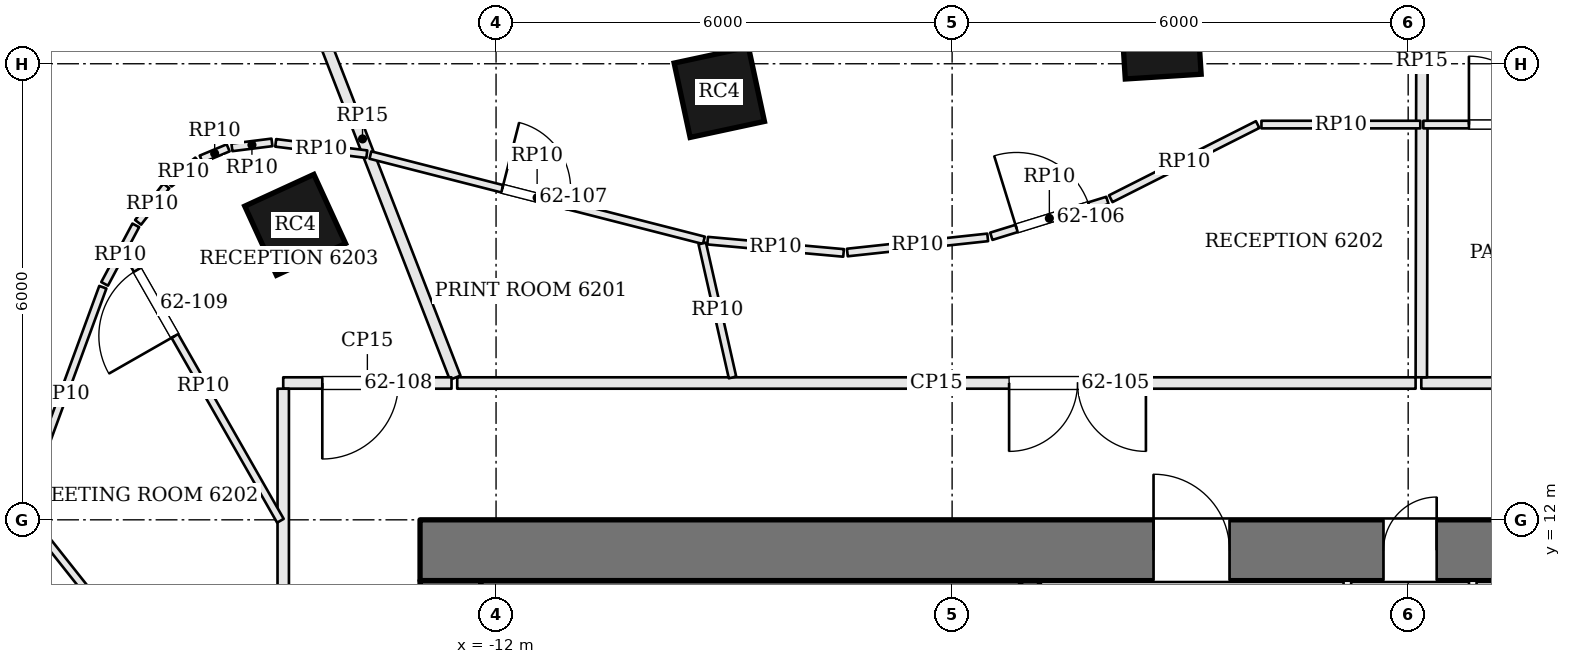
"""IFC4 building model, lengths in metres.
Left out: names, types, materials, properties, quantities, classifications, styles, units other than length and angle.
Written with IfcOpenShell. Run it as: python <this file> out.ifc"""

import sys

from ifc_helpers import new_model, si_unit, direction, frame, frame_2d, origin, origin_2d, place, context, subcontext, project, spatial, rectangle, extrude, element, fill, save


model = new_model("IFC4")
c1 = context("Model", 3, precision=1e-05, world=origin(), true_north=direction((0.0, 1.0)))
c2 = subcontext(c1, "Body", "Model", "MODEL_VIEW")
j1 = project(units=[si_unit("LENGTHUNIT", "METRE"), si_unit("PLANEANGLEUNIT", "RADIAN")], contexts=[c1])
p1 = place(None, origin())
s1 = spatial("IfcSite", under=j1, at=p1, CompositionType="ELEMENT")
p2 = place(p1, origin())
s2 = spatial("IfcBuilding", under=s1, at=p2, CompositionType="ELEMENT")
p3 = place(p2, frame((0.0, 0.0, 252.6)))
s3 = spatial("IfcBuildingStorey", under=s2, at=p3, CompositionType="ELEMENT", Elevation=252.6)
p4 = place(p3, frame((-13.0, 11.6, 0.0), z_axis=(0.0, 0.0, 1.0), x_axis=(1.0, 0.0, 0.0)))
e1 = element("IfcWall", 1, at=p4, inside=s3, PredefinedType="SHEAR", context=c2, shape_type="SweptSolid", body=[
    extrude(rectangle(XDim=26.0, YDim=0.8, at=frame_2d((13.0, 0.0))), origin(), (0.0, 0.0, 1.0), 3.9),
])
p5 = place(p4, frame((9.65, 0.0, 0.0)))
e2 = element("IfcOpeningElement", 2, at=p5, cuts=e1, PredefinedType="OPENING", context=c2, shape_type="SweptSolid", body=[
    extrude(rectangle(XDim=1.0, YDim=2.1, at=frame_2d((0.5, 1.05))), frame((0.0, 0.41, 0.0), z_axis=(0.0, -1.0, 0.0), x_axis=(1.0, 0.0, 0.0)), (0.0, 0.0, 1.0), 0.82),
])
p6 = place(p4, frame((12.675, 0.0, 0.0)))
e3 = element("IfcOpeningElement", 3, at=p6, cuts=e1, PredefinedType="OPENING", context=c2, shape_type="SweptSolid", body=[
    extrude(rectangle(XDim=0.7, YDim=2.1, at=frame_2d((0.35, 1.05))), frame((0.0, 0.41, 0.0), z_axis=(0.0, -1.0, 0.0), x_axis=(1.0, 0.0, 0.0)), (0.0, 0.0, 1.0), 0.82),
])
p7 = place(p4, frame((14.725, 0.0, 0.0)))
e4 = element("IfcOpeningElement", 4, at=p7, cuts=e1, PredefinedType="OPENING", context=c2, shape_type="SweptSolid", body=[
    extrude(rectangle(XDim=0.7, YDim=2.1, at=frame_2d((0.35, 1.05))), frame((0.0, 0.41, 0.0), z_axis=(0.0, -1.0, 0.0), x_axis=(1.0, 0.0, 0.0)), (0.0, 0.0, 1.0), 0.82),
])
p8 = place(p4, frame((16.6, 0.0, 0.0)))
e5 = element("IfcOpeningElement", 5, at=p8, cuts=e1, PredefinedType="OPENING", context=c2, shape_type="SweptSolid", body=[
    extrude(rectangle(XDim=1.0, YDim=2.1, at=frame_2d((0.5, 1.05))), frame((0.0, 0.41, 0.0), z_axis=(0.0, -1.0, 0.0), x_axis=(1.0, 0.0, 0.0)), (0.0, 0.0, 1.0), 0.82),
])
p9 = place(p3, frame((-12.6, -2.2, 0.0), z_axis=(0.0, 0.0, 1.0), x_axis=(0.0, 1.0, 0.0)))
e6 = element("IfcWall", 6, at=p9, inside=s3, PredefinedType="SHEAR", context=c2, shape_type="SweptSolid", body=[
    extrude(rectangle(XDim=13.4, YDim=0.8, at=frame_2d((6.7, 0.0))), origin(), (0.0, 0.0, 1.0), 3.9),
])
p10 = place(p9, frame((4.2, 0.0, 0.0)))
e7 = element("IfcOpeningElement", 7, at=p10, cuts=e6, PredefinedType="OPENING", context=c2, shape_type="SweptSolid", body=[
    extrude(rectangle(XDim=1.8, YDim=2.1, at=frame_2d((0.9, 1.05))), frame((0.0, 0.41, 0.0), z_axis=(0.0, -1.0, 0.0), x_axis=(1.0, 0.0, 0.0)), (0.0, 0.0, 1.0), 0.82),
])
for number, where, z_axis, x_axis in (
    (8, (-3.254, 18.33, 0.0), (0.0, 0.0, 1.0), (-0.998, -0.063, 0.0)),
    (9, (-9.063, 17.625, 0.0), (0.0, 0.0, 1.0), (-0.978, -0.21, 0.0)),
    (10, (-14.643, 15.881, 0.0), (0.0, 0.0, 1.0), (-0.909, -0.417, 0.0)),
):
    element("IfcColumn", number, at=place(p3, frame(where, z_axis=z_axis, x_axis=x_axis)), inside=s3, PredefinedType="COLUMN", context=c2, shape_type="SweptSolid", body=[
        extrude(rectangle(XDim=1.0, YDim=1.0, at=origin_2d()), origin(), (0.0, 0.0, 1.0), 3.9),
    ])
p11 = place(p3, frame((-4.975, -2.2, 0.0), z_axis=(0.0, 0.0, 1.0), x_axis=(0.0, 1.0, 0.0)))
e11 = element("IfcWall", 11, at=p11, inside=s3, PredefinedType="SOLIDWALL", context=c2, shape_type="SweptSolid", body=[
    extrude(rectangle(XDim=13.4, YDim=0.25, at=frame_2d((6.7, 0.0))), origin(), (0.0, 0.0, 1.0), 3.7),
])
p12 = place(p11, frame((5.25, 0.0, 0.0)))
e12 = element("IfcOpeningElement", 12, at=p12, cuts=e11, PredefinedType="OPENING", context=c2, shape_type="SweptSolid", body=[
    extrude(rectangle(XDim=1.2, YDim=2.1, at=frame_2d((0.6, 1.05))), frame((0.0, 0.135, 0.0), z_axis=(0.0, -1.0, 0.0), x_axis=(1.0, 0.0, 0.0)), (0.0, 0.0, 1.0), 0.27),
])
p13 = place(p3, frame((-12.2, 10.9, 0.0), z_axis=(0.0, 0.0, 1.0), x_axis=(1.0, 0.0, 0.0)))
e13 = element("IfcWall", 13, at=p13, inside=s3, PredefinedType="SOLIDWALL", context=c2, shape_type="SweptSolid", body=[
    extrude(rectangle(XDim=7.1, YDim=0.6, at=frame_2d((3.55, 0.0))), origin(), (0.0, 0.0, 1.0), 3.7),
])
for number, where, z_axis, x_axis in (
    (14, (-0.8, 8.6, 0.0), (0.0, 0.0, 1.0), (0.0, 1.0, 0.0)),
    (15, (0.85, 8.6, 0.0), (0.0, 0.0, 1.0), (0.0, 1.0, 0.0)),
):
    element("IfcWall", number, at=place(p3, frame(where, z_axis=z_axis, x_axis=x_axis)), inside=s3, PredefinedType="PARTITIONING", context=c2, shape_type="SweptSolid", body=[
        extrude(rectangle(XDim=2.6, YDim=0.1, at=frame_2d((1.3, 0.0))), origin(), (0.0, 0.0, 1.0), 3.7),
    ])
p14 = place(p3, frame((11.727, 13.8, 0.0), z_axis=(0.0, 0.0, 1.0), x_axis=(-1.0, 0.0, 0.0)))
e16 = element("IfcWall", 16, at=p14, inside=s3, PredefinedType="PARTITIONING", context=c2, shape_type="SweptSolid", body=[
    extrude(rectangle(XDim=11.554, YDim=0.15, at=frame_2d((5.777, 0.0))), origin(), (0.0, 0.0, 1.0), 3.084),
])
p15 = place(p14, frame((2.04, 0.0, 0.0)))
e17 = element("IfcOpeningElement", 17, at=p15, cuts=e16, PredefinedType="OPENING", context=c2, shape_type="SweptSolid", body=[
    extrude(rectangle(XDim=1.8, YDim=2.1, at=frame_2d((0.9, 1.05))), frame((0.0, 0.085, 0.0), z_axis=(0.0, -1.0, 0.0), x_axis=(1.0, 0.0, 0.0)), (0.0, 0.0, 1.0), 0.17),
])
p16 = place(p14, frame((6.737, 0.0, 0.0)))
e18 = element("IfcOpeningElement", 18, at=p16, cuts=e16, PredefinedType="OPENING", context=c2, shape_type="SweptSolid", body=[
    extrude(rectangle(XDim=1.0, YDim=2.4, at=frame_2d((0.5, 1.2))), frame((0.0, 0.085, 0.0), z_axis=(0.0, -1.0, 0.0), x_axis=(1.0, 0.0, 0.0)), (0.0, 0.0, 1.0), 0.17),
])
p17 = place(p3, frame((0.189, 22.19, 0.0), z_axis=(0.0, 0.0, 1.0), x_axis=(-0.001967286324, -0.99999806489, 0.0)))
e19 = element("IfcWall", 19, at=p17, inside=s3, PredefinedType="PARTITIONING", context=c2, shape_type="SweptSolid", body=[
    extrude(rectangle(XDim=8.315, YDim=0.15, at=frame_2d((4.157, 0.0))), origin(), (0.0, 0.0, 1.0), 3.084),
])
p18 = place(p3, frame((0.098, 13.8, 0.0), z_axis=(0.0, 0.0, 1.0), x_axis=(-1.0, 0.0, 0.0)))
e20 = element("IfcWall", 20, at=p18, inside=s3, PredefinedType="PARTITIONING", context=c2, shape_type="SweptSolid", body=[
    extrude(rectangle(XDim=12.609, YDim=0.15, at=frame_2d((6.304, 0.0))), origin(), (0.0, 0.0, 1.0), 3.084),
])
p19 = place(p18, frame((3.548, 0.0, 0.0)))
e21 = element("IfcOpeningElement", 21, at=p19, cuts=e20, PredefinedType="OPENING", context=c2, shape_type="SweptSolid", body=[
    extrude(rectangle(XDim=1.8, YDim=2.1, at=frame_2d((0.9, 1.05))), frame((0.0, 0.085, 0.0), z_axis=(0.0, -1.0, 0.0), x_axis=(1.0, 0.0, 0.0)), (0.0, 0.0, 1.0), 0.17),
])
p20 = place(p3, frame((-14.976, 20.153, 0.0), z_axis=(0.0, 0.0, 1.0), x_axis=(0.361720652029, -0.932286527788, 0.0)))
e22 = element("IfcWall", 22, at=p20, inside=s3, PredefinedType="PARTITIONING", context=c2, shape_type="SweptSolid", body=[
    extrude(rectangle(XDim=6.739, YDim=0.15, at=frame_2d((3.37, 0.0))), origin(), (0.0, 0.0, 1.0), 3.084),
])
p21 = place(p3, frame((-12.586, 13.8, 0.0), z_axis=(0.0, 0.0, 1.0), x_axis=(-1.0, 0.0, 0.0)))
e23 = element("IfcWall", 23, at=p21, inside=s3, PredefinedType="PARTITIONING", context=c2, shape_type="SweptSolid", body=[
    extrude(rectangle(XDim=2.214, YDim=0.15, at=frame_2d((1.107, 0.0))), origin(), (0.0, 0.0, 1.0), 3.084),
])
p22 = place(p21, frame((0.7, 0.0, 0.0)))
e24 = element("IfcOpeningElement", 24, at=p22, cuts=e23, PredefinedType="OPENING", context=c2, shape_type="SweptSolid", body=[
    extrude(rectangle(XDim=1.0, YDim=2.1, at=frame_2d((0.5, 1.05))), frame((0.0, 0.085, 0.0), z_axis=(0.0, -1.0, 0.0), x_axis=(1.0, 0.0, 0.0)), (0.0, 0.0, 1.0), 0.17),
])
p23 = place(p3, frame((-14.8, 13.725, 0.0), z_axis=(0.0, 0.0, 1.0), x_axis=(0.0, -1.0, 0.0)))
e25 = element("IfcWall", 25, at=p23, inside=s3, PredefinedType="PARTITIONING", context=c2, shape_type="SweptSolid", body=[
    extrude(rectangle(XDim=10.038, YDim=0.15, at=frame_2d((5.019, 0.0))), origin(), (0.0, 0.0, 1.0), 3.084),
])
p24 = place(p23, frame((3.361, 0.0, 0.0)))
e26 = element("IfcOpeningElement", 26, at=p24, cuts=e25, PredefinedType="OPENING", context=c2, shape_type="SweptSolid", body=[
    extrude(rectangle(XDim=1.0, YDim=2.4, at=frame_2d((0.5, 1.2))), frame((0.0, 0.085, 0.0), z_axis=(0.0, -1.0, 0.0), x_axis=(1.0, 0.0, 0.0)), (0.0, 0.0, 1.0), 0.17),
])
p25 = place(p23, frame((6.712, 0.0, 0.0)))
e27 = element("IfcOpeningElement", 27, at=p25, cuts=e25, PredefinedType="OPENING", context=c2, shape_type="SweptSolid", body=[
    extrude(rectangle(XDim=1.0, YDim=2.4, at=frame_2d((0.5, 1.2))), frame((0.0, 0.085, 0.0), z_axis=(0.0, -1.0, 0.0), x_axis=(1.0, 0.0, 0.0)), (0.0, 0.0, 1.0), 0.17),
])
p26 = place(p23, frame((8.75, 0.0, 0.0)))
e28 = element("IfcOpeningElement", 28, at=p26, cuts=e25, PredefinedType="OPENING", context=c2, shape_type="SweptSolid", body=[
    extrude(rectangle(XDim=0.9, YDim=2.1, at=frame_2d((0.45, 1.05))), frame((0.0, 0.085, 0.0), z_axis=(0.0, -1.0, 0.0), x_axis=(1.0, 0.0, 0.0)), (0.0, 0.0, 1.0), 0.17),
])
p27 = place(p3, frame((0.199, 17.2, 0.0), z_axis=(0.0, 0.0, 1.0), x_axis=(1.0, 0.0, 0.0)))
e29 = element("IfcWall", 29, at=p27, inside=s3, PredefinedType="PARTITIONING", context=c2, shape_type="SweptSolid", body=[
    extrude(rectangle(XDim=6.586, YDim=0.1, at=frame_2d((3.293, 0.0))), origin(), (0.0, 0.0, 1.0), 3.084),
])
p28 = place(p27, frame((0.6, 0.0, 0.0)))
e30 = element("IfcOpeningElement", 30, at=p28, cuts=e29, PredefinedType="OPENING", context=c2, shape_type="SweptSolid", body=[
    extrude(rectangle(XDim=0.9, YDim=2.1, at=frame_2d((0.45, 1.05))), frame((0.0, 0.06, 0.0), z_axis=(0.0, -1.0, 0.0), x_axis=(1.0, 0.0, 0.0)), (0.0, 0.0, 1.0), 0.12),
])
p29 = place(p3, frame((-13.653, 16.799, 0.0), z_axis=(0.0, 0.0, 1.0), x_axis=(0.968837918763, -0.247695553386, 0.0)))
e31 = element("IfcWall", 31, at=p29, inside=s3, PredefinedType="PARTITIONING", context=c2, shape_type="SweptSolid", body=[
    extrude(rectangle(XDim=4.528, YDim=0.1, at=frame_2d((2.264, 0.0))), origin(), (0.0, 0.0, 1.0), 3.084),
])
p30 = place(p29, frame((1.79, 0.0, 0.0)))
e32 = element("IfcOpeningElement", 32, at=p30, cuts=e31, PredefinedType="OPENING", context=c2, shape_type="SweptSolid", body=[
    extrude(rectangle(XDim=0.9, YDim=2.1, at=frame_2d((0.45, 1.05))), frame((0.0, 0.06, 0.0), z_axis=(0.0, -1.0, 0.0), x_axis=(1.0, 0.0, 0.0)), (0.0, 0.0, 1.0), 0.12),
])
p31 = place(p3, frame((-9.216, 15.673, 0.0), z_axis=(0.0, 0.0, 1.0), x_axis=(0.995953168248, -0.089873726172, 0.0)))
e33 = element("IfcWall", 33, at=p31, inside=s3, PredefinedType="PARTITIONING", context=c2, shape_type="SweptSolid", body=[
    extrude(rectangle(XDim=1.796, YDim=0.1, at=frame_2d((0.898, 0.0))), origin(), (0.0, 0.0, 1.0), 3.084),
])
p32 = place(p3, frame((-7.378, 15.517, 0.0), z_axis=(0.0, 0.0, 1.0), x_axis=(0.994229805258, 0.107271125359, 0.0)))
e34 = element("IfcWall", 34, at=p32, inside=s3, PredefinedType="PARTITIONING", context=c2, shape_type="SweptSolid", body=[
    extrude(rectangle(XDim=1.857, YDim=0.1, at=frame_2d((0.929, 0.0))), origin(), (0.0, 0.0, 1.0), 3.084),
])
p33 = place(p3, frame((-5.484, 15.73, 0.0), z_axis=(0.0, 0.0, 1.0), x_axis=(0.955448083824, 0.295159209778, 0.0)))
e35 = element("IfcWall", 35, at=p33, inside=s3, PredefinedType="PARTITIONING", context=c2, shape_type="SweptSolid", body=[
    extrude(rectangle(XDim=1.598, YDim=0.1, at=frame_2d((0.799, 0.0))), origin(), (0.0, 0.0, 1.0), 3.084),
])
p34 = place(p33, frame((0.348, 0.0, 0.0)))
e36 = element("IfcOpeningElement", 36, at=p34, cuts=e35, PredefinedType="OPENING", context=c2, shape_type="SweptSolid", body=[
    extrude(rectangle(XDim=1.0, YDim=2.1, at=frame_2d((0.5, 1.05))), frame((0.0, 0.06, 0.0), z_axis=(0.0, -1.0, 0.0), x_axis=(1.0, 0.0, 0.0)), (0.0, 0.0, 1.0), 0.12),
])
p35 = place(p3, frame((-3.913, 16.225, 0.0), z_axis=(0.0, 0.0, 1.0), x_axis=(0.892706044325, 0.450639455026, 0.0)))
e37 = element("IfcWall", 37, at=p35, inside=s3, PredefinedType="PARTITIONING", context=c2, shape_type="SweptSolid", body=[
    extrude(rectangle(XDim=2.164, YDim=0.1, at=frame_2d((1.082, 0.0))), origin(), (0.0, 0.0, 1.0), 3.084),
])
p36 = place(p3, frame((-1.93, 17.2, 0.0), z_axis=(0.0, 0.0, 1.0), x_axis=(1.0, 0.0, 0.0)))
e38 = element("IfcWall", 38, at=p36, inside=s3, PredefinedType="PARTITIONING", context=c2, shape_type="SweptSolid", body=[
    extrude(rectangle(XDim=2.09, YDim=0.1, at=frame_2d((1.045, 0.0))), origin(), (0.0, 0.0, 1.0), 3.084),
])
p37 = place(p3, frame((-8.889, 13.873, 0.0), z_axis=(0.0, 0.0, 1.0), x_axis=(-0.22037699084, 0.975414774293, 0.0)))
e39 = element("IfcWall", 39, at=p37, inside=s3, PredefinedType="PARTITIONING", context=c2, shape_type="SweptSolid", body=[
    extrude(rectangle(XDim=1.807, YDim=0.1, at=frame_2d((0.903, 0.0))), origin(), (0.0, 0.0, 1.0), 3.084),
])
p38 = place(p3, frame((-18.2, 12.261, 0.0), z_axis=(0.0, 0.0, 1.0), x_axis=(0.344384562173, 0.938828670917, 0.0)))
e40 = element("IfcWall", 40, at=p38, inside=s3, PredefinedType="PARTITIONING", context=c2, shape_type="SweptSolid", body=[
    extrude(rectangle(XDim=2.982, YDim=0.1, at=frame_2d((1.491, 0.0))), origin(), (0.0, 0.0, 1.0), 3.084),
])
p39 = place(p3, frame((-17.15, 15.104, 0.0), z_axis=(0.0, 0.0, 1.0), x_axis=(0.46990536129, 0.882716801376, 0.0)))
e41 = element("IfcWall", 41, at=p39, inside=s3, PredefinedType="PARTITIONING", context=c2, shape_type="SweptSolid", body=[
    extrude(rectangle(XDim=0.872, YDim=0.1, at=frame_2d((0.436, 0.0))), origin(), (0.0, 0.0, 1.0), 3.084),
])
p40 = place(p3, frame((-16.709, 15.914, 0.0), z_axis=(0.0, 0.0, 1.0), x_axis=(0.612181321454, 0.790717414544, 0.0)))
e42 = element("IfcWall", 42, at=p40, inside=s3, PredefinedType="PARTITIONING", context=c2, shape_type="SweptSolid", body=[
    extrude(rectangle(XDim=0.606, YDim=0.1, at=frame_2d((0.303, 0.0))), origin(), (0.0, 0.0, 1.0), 3.084),
])
p41 = place(p3, frame((-16.3, 16.424, 0.0), z_axis=(0.0, 0.0, 1.0), x_axis=(0.777836101026, 0.628467182867, 0.0)))
e43 = element("IfcWall", 43, at=p41, inside=s3, PredefinedType="PARTITIONING", context=c2, shape_type="SweptSolid", body=[
    extrude(rectangle(XDim=0.48, YDim=0.1, at=frame_2d((0.24, 0.0))), origin(), (0.0, 0.0, 1.0), 3.084),
])
p42 = place(p3, frame((-15.879, 16.746, 0.0), z_axis=(0.0, 0.0, 1.0), x_axis=(0.922945318828, 0.384931082732, 0.0)))
e44 = element("IfcWall", 44, at=p42, inside=s3, PredefinedType="PARTITIONING", context=c2, shape_type="SweptSolid", body=[
    extrude(rectangle(XDim=0.384, YDim=0.1, at=frame_2d((0.192, 0.0))), origin(), (0.0, 0.0, 1.0), 3.084),
])
p43 = place(p3, frame((-15.475, 16.9, 0.0), z_axis=(0.0, 0.0, 1.0), x_axis=(0.992369617548, 0.123298589477, 0.0)))
e45 = element("IfcWall", 45, at=p43, inside=s3, PredefinedType="PARTITIONING", context=c2, shape_type="SweptSolid", body=[
    extrude(rectangle(XDim=0.531, YDim=0.1, at=frame_2d((0.265, 0.0))), origin(), (0.0, 0.0, 1.0), 3.084),
])
p44 = place(p3, frame((-14.899, 16.959, 0.0), z_axis=(0.0, 0.0, 1.0), x_axis=(0.992389459051, -0.123138789846, 0.0)))
e46 = element("IfcWall", 46, at=p44, inside=s3, PredefinedType="PARTITIONING", context=c2, shape_type="SweptSolid", body=[
    extrude(rectangle(XDim=1.208, YDim=0.1, at=frame_2d((0.604, 0.0))), origin(), (0.0, 0.0, 1.0), 3.084),
])
p45 = place(p3, frame((-14.837, 11.988, 0.0), z_axis=(0.0, 0.0, 1.0), x_axis=(-0.495920621108, 0.868367858433, 0.0)))
e47 = element("IfcWall", 47, at=p45, inside=s3, PredefinedType="PARTITIONING", context=c2, shape_type="SweptSolid", body=[
    extrude(rectangle(XDim=4.095, YDim=0.1, at=frame_2d((2.047, 0.0))), origin(), (0.0, 0.0, 1.0), 3.084),
])
p46 = place(p45, frame((2.8, 0.0, 0.0)))
e48 = element("IfcOpeningElement", 48, at=p46, cuts=e47, PredefinedType="OPENING", context=c2, shape_type="SweptSolid", body=[
    extrude(rectangle(XDim=1.0, YDim=2.4, at=frame_2d((0.5, 1.2))), frame((0.0, 0.06, 0.0), z_axis=(0.0, -1.0, 0.0), x_axis=(1.0, 0.0, 0.0)), (0.0, 0.0, 1.0), 0.12),
])
p47 = place(p3, frame((-14.847, 7.864, 0.0), z_axis=(0.0, 0.0, 1.0), x_axis=(-0.62137054643, 0.783516843488, 0.0)))
e49 = element("IfcWall", 49, at=p47, inside=s3, PredefinedType="PARTITIONING", context=c2, shape_type="SweptSolid", body=[
    extrude(rectangle(XDim=5.347, YDim=0.1, at=frame_2d((2.673, 0.0))), origin(), (0.0, 0.0, 1.0), 3.084),
])
p48 = place(p5, origin())
e50 = element("IfcDoor", 50, at=p48, inside=s3, OperationType="SINGLE_SWING_LEFT", PredefinedType="DOOR", context=c2, shape_type="SweptSolid", body=[
    extrude(rectangle(XDim=1.0, YDim=2.1, at=frame_2d((0.5, 1.05))), frame((0.0, 0.025, 0.0), z_axis=(0.0, -1.0, 0.0), x_axis=(1.0, 0.0, 0.0)), (0.0, 0.0, 1.0), 0.05),
])
fill(e2, e50)
p49 = place(p6, origin())
e51 = element("IfcDoor", 51, at=p49, inside=s3, OperationType="SINGLE_SWING_RIGHT", PredefinedType="DOOR", context=c2, shape_type="SweptSolid", body=[
    extrude(rectangle(XDim=0.7, YDim=2.1, at=frame_2d((0.35, 1.05))), frame((0.0, 0.025, 0.0), z_axis=(0.0, -1.0, 0.0), x_axis=(1.0, 0.0, 0.0)), (0.0, 0.0, 1.0), 0.05),
])
fill(e3, e51)
p50 = place(p28, origin())
e52 = element("IfcDoor", 52, at=p50, inside=s3, OperationType="SINGLE_SWING_LEFT", PredefinedType="DOOR", context=c2, shape_type="SweptSolid", body=[
    extrude(rectangle(XDim=0.9, YDim=2.1, at=frame_2d((0.45, 1.05))), frame((0.0, 0.025, 0.0), z_axis=(0.0, -1.0, 0.0), x_axis=(1.0, 0.0, 0.0)), (0.0, 0.0, 1.0), 0.05),
])
fill(e30, e52)
p51 = place(p19, origin())
e53 = element("IfcDoor", 53, at=p51, inside=s3, OperationType="DOUBLE_DOOR_SINGLE_SWING", PredefinedType="DOOR", context=c2, shape_type="SweptSolid", body=[
    extrude(rectangle(XDim=1.8, YDim=2.1, at=frame_2d((0.9, 1.05))), frame((0.0, 0.025, 0.0), z_axis=(0.0, -1.0, 0.0), x_axis=(1.0, 0.0, 0.0)), (0.0, 0.0, 1.0), 0.05),
])
fill(e21, e53)
p52 = place(p34, origin())
e54 = element("IfcDoor", 54, at=p52, inside=s3, OperationType="SINGLE_SWING_LEFT", PredefinedType="DOOR", context=c2, shape_type="SweptSolid", body=[
    extrude(rectangle(XDim=1.0, YDim=2.1, at=frame_2d((0.5, 1.05))), frame((0.0, 0.025, 0.0), z_axis=(0.0, -1.0, 0.0), x_axis=(1.0, 0.0, 0.0)), (0.0, 0.0, 1.0), 0.05),
])
fill(e36, e54)
p53 = place(p30, origin())
e55 = element("IfcDoor", 55, at=p53, inside=s3, OperationType="SINGLE_SWING_LEFT", PredefinedType="DOOR", context=c2, shape_type="SweptSolid", body=[
    extrude(rectangle(XDim=0.9, YDim=2.1, at=frame_2d((0.45, 1.05))), frame((0.0, 0.025, 0.0), z_axis=(0.0, -1.0, 0.0), x_axis=(1.0, 0.0, 0.0)), (0.0, 0.0, 1.0), 0.05),
])
fill(e32, e55)
p54 = place(p22, origin())
e56 = element("IfcDoor", 56, at=p54, inside=s3, OperationType="SINGLE_SWING_RIGHT", PredefinedType="DOOR", context=c2, shape_type="SweptSolid", body=[
    extrude(rectangle(XDim=1.0, YDim=2.1, at=frame_2d((0.5, 1.05))), frame((0.0, 0.025, 0.0), z_axis=(0.0, -1.0, 0.0), x_axis=(1.0, 0.0, 0.0)), (0.0, 0.0, 1.0), 0.05),
])
fill(e24, e56)
p55 = place(p46, origin())
e57 = element("IfcDoor", 57, at=p55, inside=s3, OperationType="SINGLE_SWING_LEFT", PredefinedType="DOOR", context=c2, shape_type="SweptSolid", body=[
    extrude(rectangle(XDim=1.0, YDim=2.4, at=frame_2d((0.5, 1.2))), frame((0.0, 0.025, 0.0), z_axis=(0.0, -1.0, 0.0), x_axis=(1.0, 0.0, 0.0)), (0.0, 0.0, 1.0), 0.05),
])
fill(e48, e57)
save(model, sys.argv[1])
